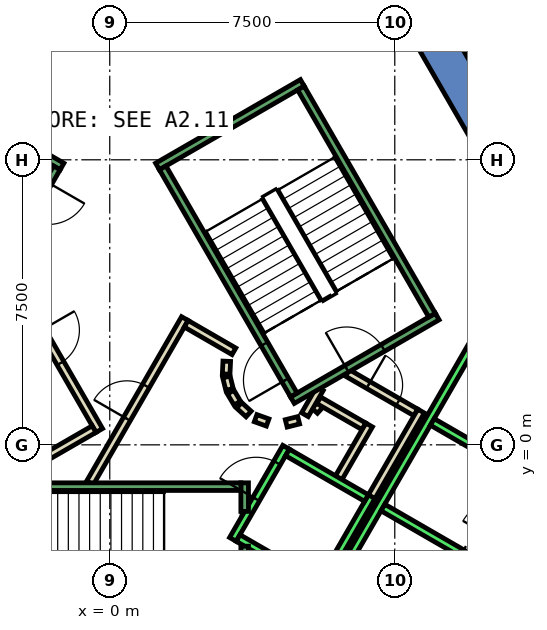
"""IFC4 building model, lengths in metres.
Left out: names, types, materials, properties, quantities, classifications, styles, units other than length and angle.
Written with IfcOpenShell. Run it as: python <this file> out.ifc"""

import sys

from ifc_helpers import new_model, si_unit, direction, frame, frame_2d, origin, place, context, subcontext, project, spatial, polyline, rectangle, outline, extrude, element, fill, save


model = new_model("IFC4")
c1 = context("Model", 3, precision=1e-05, world=origin(), true_north=direction((0.0, 1.0)))
c2 = subcontext(c1, "Body", "Model", "MODEL_VIEW")
j1 = project(units=[si_unit("LENGTHUNIT", "METRE"), si_unit("PLANEANGLEUNIT", "RADIAN")], contexts=[c1])
p1 = place(None, origin())
s1 = spatial("IfcSite", under=j1, at=p1, CompositionType="ELEMENT")
p2 = place(p1, origin())
s2 = spatial("IfcBuilding", under=s1, at=p2, CompositionType="ELEMENT")
p3 = place(p2, frame((0.0, 0.0, 43.4)))
s3 = spatial("IfcBuildingStorey", under=s2, at=p3, CompositionType="ELEMENT", Elevation=43.4)
p4 = place(p3, frame((0.0, 0.0, -0.4)))
e1 = element("IfcWall", 1, at=p4, inside=s3, PredefinedType="SHEAR", context=c2, shape_type="SweptSolid", body=[
    extrude(outline(polyline([(8.517, 11.748), (7.651, 11.248), (12.702, 2.5), (13.856, 2.5), (8.517, 11.748)])), origin(), (0.0, 0.0, 1.0), 4.2),
])
p5 = place(p3, frame((0.0, 0.0, -0.4)))
e2 = element("IfcWall", 2, at=p5, inside=s3, PredefinedType="SHEAR", context=c2, shape_type="SweptSolid", body=[
    extrude(outline(polyline([(10.717, -2.937), (9.851, -2.437), (9.201, -3.563), (10.067, -4.063), (10.717, -2.937)])), origin(), (0.0, 0.0, 1.0), 4.2),
])
p6 = place(p3, frame((5.39, 0.898, 0.0), z_axis=(0.0, 0.0, 1.0), x_axis=(0.673828488714, 0.738887791073, 0.0)))
e3 = element("IfcWall", 3, at=p6, inside=s3, PredefinedType="PARTITIONING", context=c2, shape_type="SweptSolid", body=[
    extrude(rectangle(XDim=0.263, YDim=0.2, at=frame_2d((0.131, 0.0))), origin(), (0.0, 0.0, 1.0), 3.8),
])
p7 = place(p3, frame((5.499, 1.172, 0.0), z_axis=(0.0, 0.0, 1.0), x_axis=(0.866333505267, -0.499465972466, 0.0)))
e4 = element("IfcWall", 4, at=p7, inside=s3, PredefinedType="PARTITIONING", context=c2, shape_type="SweptSolid", body=[
    extrude(rectangle(XDim=1.374, YDim=0.2, at=frame_2d((0.687, 0.0))), origin(), (0.0, 0.0, 1.0), 3.8),
])
p8 = place(p3, frame((6.826, 0.522, 0.0), z_axis=(0.0, 0.0, 1.0), x_axis=(-0.500016722714, -0.866015748706, 0.0)))
e5 = element("IfcWall", 5, at=p8, inside=s3, PredefinedType="PARTITIONING", context=c2, shape_type="SweptSolid", body=[
    extrude(rectangle(XDim=1.7, YDim=0.2, at=frame_2d((0.85, 0.0))), origin(), (0.0, 0.0, 1.0), 3.8),
])
p9 = place(p3, frame((6.25, 1.894, 0.0), z_axis=(0.0, 0.0, 1.0), x_axis=(0.866043184279, -0.499969202016, 0.0)))
e6 = element("IfcWall", 6, at=p9, inside=s3, PredefinedType="PARTITIONING", context=c2, shape_type="SweptSolid", body=[
    extrude(rectangle(XDim=2.084, YDim=0.2, at=frame_2d((1.042, 0.0))), origin(), (0.0, 0.0, 1.0), 3.8),
])
p10 = place(p9, frame((0.642, 0.0, 0.0)))
e7 = element("IfcOpeningElement", 7, at=p10, cuts=e6, PredefinedType="OPENING", context=c2, shape_type="SweptSolid", body=[
    extrude(rectangle(XDim=0.9, YDim=2.1, at=frame_2d((0.45, 1.05))), frame((0.0, 0.11, 0.0), z_axis=(0.0, -1.0, 0.0), x_axis=(1.0, 0.0, 0.0)), (0.0, 0.0, 1.0), 0.22),
])
p11 = place(p3, frame((8.192, 0.888, 0.0), z_axis=(0.0, 0.0, 1.0), x_axis=(-0.499940625693, -0.866059680843, 0.0)))
e8 = element("IfcWall", 8, at=p11, inside=s3, PredefinedType="PARTITIONING", context=c2, shape_type="SweptSolid", body=[
    extrude(rectangle(XDim=2.68, YDim=0.2, at=frame_2d((1.34, 0.0))), origin(), (0.0, 0.0, 1.0), 3.8),
])
p12 = place(p3, frame((5.135, 0.793, 0.0), z_axis=(0.0, 0.0, 1.0), x_axis=(0.499526442893, 0.866298639529, 0.0)))
e9 = element("IfcWall", 9, at=p12, inside=s3, PredefinedType="PARTITIONING", context=c2, shape_type="SweptSolid", body=[
    extrude(rectangle(XDim=0.791, YDim=0.2, at=frame_2d((0.396, 0.0))), origin(), (0.0, 0.0, 1.0), 3.8),
])
p13 = place(p3, frame((-0.52, -1.0, 0.0), z_axis=(0.0, 0.0, 1.0), x_axis=(0.50011622646, 0.865958290007, 0.0)))
e10 = element("IfcWall", 10, at=p13, inside=s3, PredefinedType="PARTITIONING", context=c2, shape_type="SweptSolid", body=[
    extrude(rectangle(XDim=4.991, YDim=0.2, at=frame_2d((2.496, 0.0))), origin(), (0.0, 0.0, 1.0), 3.8),
])
p14 = place(p13, frame((1.945, 0.0, 0.0)))
e11 = element("IfcOpeningElement", 11, at=p14, cuts=e10, PredefinedType="OPENING", context=c2, shape_type="SweptSolid", body=[
    extrude(rectangle(XDim=1.0, YDim=2.1, at=frame_2d((0.5, 1.05))), frame((0.0, 0.11, 0.0), z_axis=(0.0, -1.0, 0.0), x_axis=(1.0, 0.0, 0.0)), (0.0, 0.0, 1.0), 0.22),
])
p15 = place(p3, frame((2.012, 3.186, 0.0), z_axis=(0.0, 0.0, 1.0), x_axis=(0.865891012941, -0.500232699559, 0.0)))
e12 = element("IfcWall", 12, at=p15, inside=s3, PredefinedType="PARTITIONING", context=c2, shape_type="SweptSolid", body=[
    extrude(rectangle(XDim=1.449, YDim=0.2, at=frame_2d((0.725, 0.0))), origin(), (0.0, 0.0, 1.0), 3.8),
])
p16 = place(p3, frame((3.079, 2.199, 0.0), z_axis=(0.0, 0.0, 1.0), x_axis=(-0.047771483479, -0.998858290933, 0.0)))
e13 = element("IfcWall", 13, at=p16, inside=s3, PredefinedType="PARTITIONING", context=c2, shape_type="SweptSolid", body=[
    extrude(rectangle(XDim=0.337, YDim=0.2, at=frame_2d((0.169, 0.0))), origin(), (0.0, 0.0, 1.0), 3.8),
])
p17 = place(p3, frame((3.07, 1.786, 0.0), z_axis=(0.0, 0.0, 1.0), x_axis=(0.242705583207, -0.970099994784, 0.0)))
e14 = element("IfcWall", 14, at=p17, inside=s3, PredefinedType="PARTITIONING", context=c2, shape_type="SweptSolid", body=[
    extrude(rectangle(XDim=0.338, YDim=0.2, at=frame_2d((0.169, 0.0))), origin(), (0.0, 0.0, 1.0), 3.8),
])
for number, where, z_axis, x_axis in (
    (15, (3.182, 1.388, 0.0), (0.0, 0.0, 1.0), (0.512, -0.859, 0.0)),
    (16, (3.404, 1.039, 0.0), (0.0, 0.0, 1.0), (0.74, -0.672, 0.0)),
):
    element("IfcWall", number, at=place(p3, frame(where, z_axis=z_axis, x_axis=x_axis)), inside=s3, PredefinedType="PARTITIONING", context=c2, shape_type="SweptSolid", body=[
        extrude(rectangle(XDim=0.338, YDim=0.2, at=frame_2d((0.169, 0.0))), origin(), (0.0, 0.0, 1.0), 3.8),
    ])
p18 = place(p3, frame((3.838, 0.702, 0.0), z_axis=(0.0, 0.0, 1.0), x_axis=(0.941035081519, -0.338308993895, 0.0)))
e17 = element("IfcWall", 17, at=p18, inside=s3, PredefinedType="PARTITIONING", context=c2, shape_type="SweptSolid", body=[
    extrude(rectangle(XDim=0.337, YDim=0.2, at=frame_2d((0.168, 0.0))), origin(), (0.0, 0.0, 1.0), 3.8),
])
p19 = place(p3, frame((4.644, 0.564, 0.0), z_axis=(0.0, 0.0, 1.0), x_axis=(0.969929076366, 0.243387729394, 0.0)))
e18 = element("IfcWall", 18, at=p19, inside=s3, PredefinedType="PARTITIONING", context=c2, shape_type="SweptSolid", body=[
    extrude(rectangle(XDim=0.337, YDim=0.2, at=frame_2d((0.168, 0.0))), origin(), (0.0, 0.0, 1.0), 3.8),
])
p20 = place(p3, frame((-2.771, 4.7, 0.0), z_axis=(0.0, 0.0, 1.0), x_axis=(0.499969479948, -0.866043023828, 0.0)))
e19 = element("IfcWall", 19, at=p20, inside=s3, PredefinedType="PARTITIONING", context=c2, shape_type="SweptSolid", body=[
    extrude(rectangle(XDim=4.99, YDim=0.2, at=frame_2d((2.495, 0.0))), origin(), (0.0, 0.0, 1.0), 3.8),
])
p21 = place(p20, frame((1.945, 0.0, 0.0)))
e20 = element("IfcOpeningElement", 20, at=p21, cuts=e19, PredefinedType="OPENING", context=c2, shape_type="SweptSolid", body=[
    extrude(rectangle(XDim=1.0, YDim=2.1, at=frame_2d((0.5, 1.05))), frame((0.0, 0.11, 0.0), z_axis=(0.0, -1.0, 0.0), x_axis=(1.0, 0.0, 0.0)), (0.0, 0.0, 1.0), 0.22),
])
p22 = place(p3, frame((-0.412, 0.414, 0.0), z_axis=(0.0, 0.0, 1.0), x_axis=(-0.866017369001, -0.500013916395, 0.0)))
e21 = element("IfcWall", 21, at=p22, inside=s3, PredefinedType="PARTITIONING", context=c2, shape_type="SweptSolid", body=[
    extrude(rectangle(XDim=1.45, YDim=0.2, at=frame_2d((0.725, 0.0))), origin(), (0.0, 0.0, 1.0), 3.8),
])
p23 = place(p3, frame((3.24, -2.488, 0.0), z_axis=(0.0, 0.0, 1.0), x_axis=(0.49994636267, 0.866056369097, 0.0)))
e22 = element("IfcWall", 22, at=p23, inside=s3, PredefinedType="STANDARD", context=c2, shape_type="SweptSolid", body=[
    extrude(rectangle(XDim=2.8, YDim=0.2, at=frame_2d((1.4, 0.0))), origin(), (0.0, 0.0, 1.0), 3.8),
])
p24 = place(p23, frame((1.225, 0.0, 0.0)))
e23 = element("IfcOpeningElement", 23, at=p24, cuts=e22, PredefinedType="OPENING", context=c2, shape_type="SweptSolid", body=[
    extrude(rectangle(XDim=1.1, YDim=2.1, at=frame_2d((0.55, 1.05))), frame((0.0, 0.11, 0.0), z_axis=(0.0, -1.0, 0.0), x_axis=(1.0, 0.0, 0.0)), (0.0, 0.0, 1.0), 0.22),
])
p25 = place(p3, frame((5.492, -3.788, 0.0), z_axis=(0.0, 0.0, 1.0), x_axis=(0.500011755427, 0.866018616679, 0.0)))
e24 = element("IfcWall", 24, at=p25, inside=s3, PredefinedType="STANDARD", context=c2, shape_type="SweptSolid", body=[
    extrude(rectangle(XDim=2.8, YDim=0.2, at=frame_2d((1.4, 0.0))), origin(), (0.0, 0.0, 1.0), 3.8),
])
p26 = place(p3, frame((3.377, -2.452, 0.0), z_axis=(0.0, 0.0, 1.0), x_axis=(0.865955154139, -0.50012165622, 0.0)))
e25 = element("IfcWall", 25, at=p26, inside=s3, PredefinedType="STANDARD", context=c2, shape_type="SweptSolid", body=[
    extrude(rectangle(XDim=2.4, YDim=0.2, at=frame_2d((1.2, 0.0))), origin(), (0.0, 0.0, 1.0), 3.8),
])
p27 = place(p3, frame((4.677, -0.2, 0.0), z_axis=(0.0, 0.0, 1.0), x_axis=(0.865973769406, -0.500089422704, 0.0)))
e26 = element("IfcWall", 26, at=p27, inside=s3, PredefinedType="STANDARD", context=c2, shape_type="SweptSolid", body=[
    extrude(rectangle(XDim=2.399, YDim=0.2, at=frame_2d((1.2, 0.0))), origin(), (0.0, 0.0, 1.0), 3.8),
])
p28 = place(p3, frame((4.451, -6.19, 0.0), z_axis=(0.0, 0.0, 1.0), x_axis=(0.50000090737, 0.866024879913, 0.0)))
e27 = element("IfcWall", 27, at=p28, inside=s3, PredefinedType="STANDARD", context=c2, shape_type="SweptSolid", body=[
    extrude(rectangle(XDim=10.6, YDim=0.2, at=frame_2d((5.3, 0.0))), origin(), (0.0, 0.0, 1.0), 3.8),
])
for number, where, z_axis, x_axis in (
    (28, (7.188, -1.65, 0.0), (0.0, 0.0, 1.0), (0.866, -0.5, 0.0)),
    (29, (8.488, 0.602, 0.0), (0.0, 0.0, 1.0), (0.866, -0.5, 0.0)),
):
    element("IfcWall", number, at=place(p3, frame(where, z_axis=z_axis, x_axis=x_axis)), inside=s3, PredefinedType="STANDARD", context=c2, shape_type="SweptSolid", body=[
        extrude(rectangle(XDim=2.5, YDim=0.2, at=frame_2d((1.25, 0.0))), origin(), (0.0, 0.0, 1.0), 3.8),
    ])
p29 = place(p3, frame((3.55, -2.667, 0.0), z_axis=(0.0, 0.0, 1.0), x_axis=(0.0, -1.0, 0.0)))
e30 = element("IfcWall", 30, at=p29, inside=s3, PredefinedType="STANDARD", context=c2, shape_type="SweptSolid", body=[
    extrude(rectangle(XDim=2.733, YDim=0.2, at=frame_2d((1.366, 0.0))), origin(), (0.0, 0.0, 1.0), 3.8),
])
p30 = place(p3, frame((3.55, -1.0, 0.0), z_axis=(0.0, 0.0, 1.0), x_axis=(0.0, -1.0, 0.0)))
e31 = element("IfcWall", 31, at=p30, inside=s3, PredefinedType="STANDARD", context=c2, shape_type="SweptSolid", body=[
    extrude(rectangle(XDim=0.751, YDim=0.2, at=frame_2d((0.375, 0.0))), origin(), (0.0, 0.0, 1.0), 3.8),
])
p31 = place(p3, frame((-3.45, -1.1, 0.0), z_axis=(0.0, 0.0, 1.0), x_axis=(1.0, 0.0, 0.0)))
e32 = element("IfcWall", 32, at=p31, inside=s3, PredefinedType="STANDARD", context=c2, shape_type="SweptSolid", body=[
    extrude(rectangle(XDim=6.9, YDim=0.2, at=frame_2d((3.45, 0.0))), origin(), (0.0, 0.0, 1.0), 3.8),
])
p32 = place(p31, frame((0.45, 0.0, 0.0)))
e33 = element("IfcOpeningElement", 33, at=p32, cuts=e32, PredefinedType="OPENING", context=c2, shape_type="SweptSolid", body=[
    extrude(rectangle(XDim=1.1, YDim=2.2, at=frame_2d((0.55, 1.1))), frame((0.0, 0.11, 0.0), z_axis=(0.0, -1.0, 0.0), x_axis=(1.0, 0.0, 0.0)), (0.0, 0.0, 1.0), 0.22),
])
p33 = place(p3, frame((4.806, 1.176, 0.0), z_axis=(0.0, 0.0, 1.0), x_axis=(0.866059941101, 0.499940174841, 0.0)))
e34 = element("IfcWall", 34, at=p33, inside=s3, PredefinedType="STANDARD", context=c2, shape_type="SweptSolid", body=[
    extrude(rectangle(XDim=4.4, YDim=0.2, at=frame_2d((2.2, 0.0))), origin(), (0.0, 0.0, 1.0), 3.8),
])
p34 = place(p33, frame((1.65, 0.0, 0.0)))
e35 = element("IfcOpeningElement", 35, at=p34, cuts=e34, PredefinedType="OPENING", context=c2, shape_type="SweptSolid", body=[
    extrude(rectangle(XDim=1.1, YDim=2.2, at=frame_2d((0.55, 1.1))), frame((0.0, 0.11, 0.0), z_axis=(0.0, -1.0, 0.0), x_axis=(1.0, 0.0, 0.0)), (0.0, 0.0, 1.0), 0.22),
])
p35 = place(p3, frame((1.256, 7.324, 0.0), z_axis=(0.0, 0.0, 1.0), x_axis=(0.866046073146, 0.499964197906, 0.0)))
e36 = element("IfcWall", 36, at=p35, inside=s3, PredefinedType="STANDARD", context=c2, shape_type="SweptSolid", body=[
    extrude(rectangle(XDim=4.4, YDim=0.2, at=frame_2d((2.2, 0.0))), origin(), (0.0, 0.0, 1.0), 3.8),
])
p36 = place(p3, frame((4.843, 1.312, 0.0), z_axis=(0.0, 0.0, 1.0), x_axis=(-0.499963383562, 0.866046543262, 0.0)))
e37 = element("IfcWall", 37, at=p36, inside=s3, PredefinedType="STANDARD", context=c2, shape_type="SweptSolid", body=[
    extrude(rectangle(XDim=6.9, YDim=0.2, at=frame_2d((3.45, 0.0))), origin(), (0.0, 0.0, 1.0), 3.8),
])
p37 = place(p36, frame((0.45, 0.0, 0.0)))
e38 = element("IfcOpeningElement", 38, at=p37, cuts=e37, PredefinedType="OPENING", context=c2, shape_type="SweptSolid", body=[
    extrude(rectangle(XDim=1.1, YDim=2.2, at=frame_2d((0.55, 1.1))), frame((0.0, 0.11, 0.0), z_axis=(0.0, -1.0, 0.0), x_axis=(1.0, 0.0, 0.0)), (0.0, 0.0, 1.0), 0.22),
])
p38 = place(p3, frame((8.48, 3.412, 0.0), z_axis=(0.0, 0.0, 1.0), x_axis=(-0.499978703459, 0.866037698999, 0.0)))
e39 = element("IfcWall", 39, at=p38, inside=s3, PredefinedType="STANDARD", context=c2, shape_type="SweptSolid", body=[
    extrude(rectangle(XDim=6.9, YDim=0.2, at=frame_2d((3.45, 0.0))), origin(), (0.0, 0.0, 1.0), 3.8),
])
p39 = place(p3, frame((-1.256, 7.324, 0.0), z_axis=(0.0, 0.0, 1.0), x_axis=(-0.866046073146, 0.499964197906, 0.0)))
e40 = element("IfcWall", 40, at=p39, inside=s3, PredefinedType="STANDARD", context=c2, shape_type="SweptSolid", body=[
    extrude(rectangle(XDim=4.4, YDim=0.2, at=frame_2d((2.2, 0.0))), origin(), (0.0, 0.0, 1.0), 3.8),
])
p40 = place(p39, frame((1.65, 0.0, 0.0)))
e41 = element("IfcOpeningElement", 41, at=p40, cuts=e40, PredefinedType="OPENING", context=c2, shape_type="SweptSolid", body=[
    extrude(rectangle(XDim=1.1, YDim=2.2, at=frame_2d((0.55, 1.1))), frame((0.0, 0.11, 0.0), z_axis=(0.0, -1.0, 0.0), x_axis=(1.0, 0.0, 0.0)), (0.0, 0.0, 1.0), 0.22),
])
p41 = place(p3, frame((-1.393, 7.288, 0.0), z_axis=(0.0, 0.0, 1.0), x_axis=(-0.499963383562, -0.866046543262, 0.0)))
e42 = element("IfcWall", 42, at=p41, inside=s3, PredefinedType="STANDARD", context=c2, shape_type="SweptSolid", body=[
    extrude(rectangle(XDim=6.9, YDim=0.2, at=frame_2d((3.45, 0.0))), origin(), (0.0, 0.0, 1.0), 3.8),
])
p42 = place(p41, frame((0.45, 0.0, 0.0)))
e43 = element("IfcOpeningElement", 43, at=p42, cuts=e42, PredefinedType="OPENING", context=c2, shape_type="SweptSolid", body=[
    extrude(rectangle(XDim=1.1, YDim=2.2, at=frame_2d((0.55, 1.1))), frame((0.0, 0.11, 0.0), z_axis=(0.0, -1.0, 0.0), x_axis=(1.0, 0.0, 0.0)), (0.0, 0.0, 1.0), 0.22),
])
p43 = place(p14, origin())
e44 = element("IfcDoor", 44, at=p43, inside=s3, OperationType="SINGLE_SWING_LEFT", PredefinedType="DOOR", context=c2, shape_type="SweptSolid", body=[
    extrude(rectangle(XDim=1.0, YDim=2.1, at=frame_2d((0.5, 1.05))), frame((0.0, 0.025, 0.0), z_axis=(0.0, -1.0, 0.0), x_axis=(1.0, 0.0, 0.0)), (0.0, 0.0, 1.0), 0.05),
])
fill(e11, e44)
p44 = place(p21, origin())
e45 = element("IfcDoor", 45, at=p44, inside=s3, OperationType="SINGLE_SWING_RIGHT", PredefinedType="DOOR", context=c2, shape_type="SweptSolid", body=[
    extrude(rectangle(XDim=1.0, YDim=2.1, at=frame_2d((0.5, 1.05))), frame((0.0, 0.025, 0.0), z_axis=(0.0, -1.0, 0.0), x_axis=(1.0, 0.0, 0.0)), (0.0, 0.0, 1.0), 0.05),
])
fill(e20, e45)
p45 = place(p10, origin())
e46 = element("IfcDoor", 46, at=p45, inside=s3, OperationType="SINGLE_SWING_LEFT", PredefinedType="DOOR", context=c2, shape_type="SweptSolid", body=[
    extrude(rectangle(XDim=0.9, YDim=2.1, at=frame_2d((0.45, 1.05))), frame((0.0, 0.025, 0.0), z_axis=(0.0, -1.0, 0.0), x_axis=(1.0, 0.0, 0.0)), (0.0, 0.0, 1.0), 0.05),
])
fill(e7, e46)
p46 = place(p24, origin())
e47 = element("IfcDoor", 47, at=p46, inside=s3, OperationType="SLIDING_TO_LEFT", PredefinedType="DOOR", context=c2, shape_type="SweptSolid", body=[
    extrude(rectangle(XDim=1.1, YDim=2.1, at=frame_2d((0.55, 1.05))), frame((0.0, 0.025, 0.0), z_axis=(0.0, -1.0, 0.0), x_axis=(1.0, 0.0, 0.0)), (0.0, 0.0, 1.0), 0.05),
])
fill(e23, e47)
p47 = place(p37, origin())
e48 = element("IfcDoor", 48, at=p47, inside=s3, OperationType="SINGLE_SWING_LEFT", PredefinedType="DOOR", context=c2, shape_type="SweptSolid", body=[
    extrude(rectangle(XDim=1.1, YDim=2.2, at=frame_2d((0.55, 1.1))), frame((0.0, 0.025, 0.0), z_axis=(0.0, -1.0, 0.0), x_axis=(1.0, 0.0, 0.0)), (0.0, 0.0, 1.0), 0.05),
])
fill(e38, e48)
p48 = place(p34, origin())
e49 = element("IfcDoor", 49, at=p48, inside=s3, OperationType="SINGLE_SWING_LEFT", PredefinedType="DOOR", context=c2, shape_type="SweptSolid", body=[
    extrude(rectangle(XDim=1.1, YDim=2.2, at=frame_2d((0.55, 1.1))), frame((0.0, 0.025, 0.0), z_axis=(0.0, -1.0, 0.0), x_axis=(1.0, 0.0, 0.0)), (0.0, 0.0, 1.0), 0.05),
])
fill(e35, e49)
save(model, sys.argv[1])
